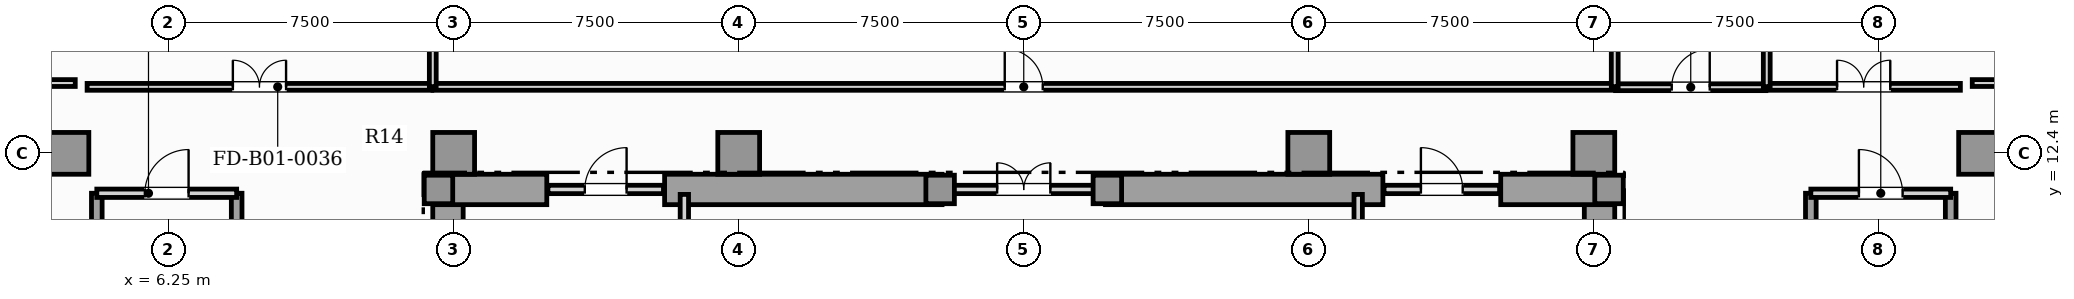
"""IFC4 building model, lengths in metres.
Left out: names, types, materials, properties, quantities, classifications, styles, units other than length and angle.
Written with IfcOpenShell. Run it as: python <this file> out.ifc"""

import sys

from ifc_helpers import new_model, si_unit, direction, frame, frame_2d, origin, origin_2d, place, context, subcontext, project, spatial, rectangle, extrude, element, fill, save


model = new_model("IFC4")
c1 = context("Model", 3, precision=1e-05, world=origin(), true_north=direction((0.0, 1.0)))
c2 = subcontext(c1, "Body", "Model", "MODEL_VIEW")
j1 = project(units=[si_unit("LENGTHUNIT", "METRE"), si_unit("PLANEANGLEUNIT", "RADIAN")], contexts=[c1])
p1 = place(None, origin())
s1 = spatial("IfcSite", under=j1, at=p1, CompositionType="ELEMENT")
p2 = place(p1, origin())
s2 = spatial("IfcBuilding", under=s1, at=p2, CompositionType="ELEMENT")
p3 = place(p2, frame((0.0, 0.0, -5.4)))
s3 = spatial("IfcBuildingStorey", under=s2, at=p3, CompositionType="ELEMENT", Elevation=-5.4)
for number, where, z_axis, x_axis in (
    (1, (13.6, 0.92, 0.0), (0.0, 0.0, 1.0), (0.0, 1.0, 0.0)),
    (2, (43.9, 0.92, 0.0), (0.0, 0.0, 1.0), (0.0, 1.0, 0.0)),
):
    element("IfcWall", number, at=place(p3, frame(where, z_axis=z_axis, x_axis=x_axis)), inside=s3, PredefinedType="SHEAR", context=c2, shape_type="SweptSolid", body=[
        extrude(rectangle(XDim=10.53, YDim=0.8, at=frame_2d((5.265, 0.0))), origin(), (0.0, 0.0, 1.0), 5.05),
    ])
p4 = place(p3, frame((13.25, 11.45, 0.0), z_axis=(0.0, 0.0, 1.0), x_axis=(1.0, 0.0, 0.0)))
e3 = element("IfcWall", 3, at=p4, inside=s3, PredefinedType="SHEAR", context=c2, shape_type="SweptSolid", body=[
    extrude(rectangle(XDim=2.95, YDim=0.8, at=frame_2d((1.475, 0.0))), origin(), (0.0, 0.0, 1.0), 5.05),
])
for number, where, z_axis, x_axis in (
    (4, (19.3, 11.45, 0.0), (0.0, 0.0, 1.0), (1.0, 0.0, 0.0)),
    (5, (30.9, 11.45, 0.0), (0.0, 0.0, 1.0), (1.0, 0.0, 0.0)),
):
    element("IfcWall", number, at=place(p3, frame(where, z_axis=z_axis, x_axis=x_axis)), inside=s3, PredefinedType="SHEAR", context=c2, shape_type="SweptSolid", body=[
        extrude(rectangle(XDim=7.3, YDim=0.8, at=frame_2d((3.65, 0.0))), origin(), (0.0, 0.0, 1.0), 5.05),
    ])
p5 = place(p3, frame((41.3, 11.45, 0.0), z_axis=(0.0, 0.0, 1.0), x_axis=(1.0, 0.0, 0.0)))
e6 = element("IfcWall", 6, at=p5, inside=s3, PredefinedType="SHEAR", context=c2, shape_type="SweptSolid", body=[
    extrude(rectangle(XDim=2.95, YDim=0.8, at=frame_2d((1.475, 0.0))), origin(), (0.0, 0.0, 1.0), 5.05),
])
for number, where, z_axis, x_axis in (
    (7, (13.35, 11.45, 0.0), (0.0, 0.0, 1.0), (1.0, 0.0, 0.0)),
    (8, (44.15, 11.45, 0.0), (0.0, 0.0, 1.0), (1.0, 0.0, 0.0)),
    (9, (26.55, 11.45, 0.0), (0.0, 0.0, 1.0), (1.0, 0.0, 0.0)),
    (10, (30.95, 11.45, 0.0), (0.0, 0.0, 1.0), (1.0, 0.0, 0.0)),
):
    element("IfcColumn", number, at=place(p3, frame(where, z_axis=z_axis, x_axis=x_axis)), inside=s3, PredefinedType="COLUMN", context=c2, shape_type="SweptSolid", body=[
        extrude(rectangle(XDim=0.75, YDim=0.75, at=origin_2d()), origin(), (0.0, 0.0, 1.0), 5.4),
    ])
for number, where, z_axis, x_axis in (
    (11, (3.6, 12.4, 0.0), (0.0, 0.0, 1.0), (1.0, 0.0, 0.0)),
    (12, (13.75, 12.4, 0.0), (0.0, 0.0, 1.0), (1.0, 0.0, 0.0)),
    (13, (43.75, 12.4, 0.0), (0.0, 0.0, 1.0), (1.0, 0.0, 0.0)),
    (14, (53.9, 12.4, 0.0), (0.0, 0.0, 1.0), (1.0, 0.0, 0.0)),
    (15, (21.25, 12.4, 0.0), (0.0, 0.0, 1.0), (1.0, 0.0, 0.0)),
    (16, (36.25, 12.4, 0.0), (0.0, 0.0, 1.0), (1.0, 0.0, 0.0)),
):
    element("IfcColumn", number, at=place(p3, frame(where, z_axis=z_axis, x_axis=x_axis)), inside=s3, PredefinedType="COLUMN", context=c2, shape_type="SweptSolid", body=[
        extrude(rectangle(XDim=1.1, YDim=1.1, at=origin_2d()), origin(), (0.0, 0.0, 1.0), 5.4),
    ])
for number, where, z_axis, x_axis in (
    (17, (4.36, 3.56, 0.0), (0.0, 0.0, 1.0), (0.0, 1.0, 0.0)),
    (18, (8.04, 3.56, 0.0), (0.0, 0.0, 1.0), (0.0, 1.0, 0.0)),
):
    element("IfcWall", number, at=place(p3, frame(where, z_axis=z_axis, x_axis=x_axis)), inside=s3, PredefinedType="SHEAR", context=c2, shape_type="SweptSolid", body=[
        extrude(rectangle(XDim=7.79, YDim=0.28, at=frame_2d((3.895, 0.0))), origin(), (0.0, 0.0, 1.0), 5.05),
    ])
p6 = place(p3, frame((4.36, 11.35, 0.0), z_axis=(0.0, 0.0, 1.0), x_axis=(1.0, 0.0, 0.0)))
e19 = element("IfcWall", 19, at=p6, inside=s3, PredefinedType="SOLIDWALL", context=c2, shape_type="SweptSolid", body=[
    extrude(rectangle(XDim=3.68, YDim=0.22, at=frame_2d((1.84, 0.0))), origin(), (0.0, 0.0, 1.0), 5.05),
])
p7 = place(p6, frame((1.265, 0.0, 0.0)))
e20 = element("IfcOpeningElement", 20, at=p7, cuts=e19, PredefinedType="OPENING", context=c2, shape_type="SweptSolid", body=[
    extrude(rectangle(XDim=1.15, YDim=2.2, at=frame_2d((0.575, 1.1))), frame((0.0, 0.12, 0.0), z_axis=(0.0, -1.0, 0.0), x_axis=(1.0, 0.0, 0.0)), (0.0, 0.0, 1.0), 0.24),
])
for number, where, z_axis, x_axis in (
    (21, (49.46, 3.56, 0.0), (0.0, 0.0, 1.0), (0.0, 1.0, 0.0)),
    (22, (53.14, 3.56, 0.0), (0.0, 0.0, 1.0), (0.0, 1.0, 0.0)),
):
    element("IfcWall", number, at=place(p3, frame(where, z_axis=z_axis, x_axis=x_axis)), inside=s3, PredefinedType="SHEAR", context=c2, shape_type="SweptSolid", body=[
        extrude(rectangle(XDim=7.79, YDim=0.28, at=frame_2d((3.895, 0.0))), origin(), (0.0, 0.0, 1.0), 5.05),
    ])
p8 = place(p3, frame((49.46, 11.35, 0.0), z_axis=(0.0, 0.0, 1.0), x_axis=(1.0, 0.0, 0.0)))
e23 = element("IfcWall", 23, at=p8, inside=s3, PredefinedType="SOLIDWALL", context=c2, shape_type="SweptSolid", body=[
    extrude(rectangle(XDim=3.68, YDim=0.22, at=frame_2d((1.84, 0.0))), origin(), (0.0, 0.0, 1.0), 5.05),
])
p9 = place(p8, frame((1.265, 0.0, 0.0)))
e24 = element("IfcOpeningElement", 24, at=p9, cuts=e23, PredefinedType="OPENING", context=c2, shape_type="SweptSolid", body=[
    extrude(rectangle(XDim=1.15, YDim=2.2, at=frame_2d((0.575, 1.1))), frame((0.0, 0.12, 0.0), z_axis=(0.0, -1.0, 0.0), x_axis=(1.0, 0.0, 0.0)), (0.0, 0.0, 1.0), 0.24),
])
p10 = place(p3, frame((19.82, 8.52, 0.0), z_axis=(0.0, 0.0, 1.0), x_axis=(0.0, 1.0, 0.0)))
e25 = element("IfcWall", 25, at=p10, inside=s3, PredefinedType="SOLIDWALL", context=c2, shape_type="SweptSolid", body=[
    extrude(rectangle(XDim=2.8, YDim=0.22, at=frame_2d((1.4, 0.0))), origin(), (0.0, 0.0, 1.0), 4.505),
])
p11 = place(p10, frame((0.85, 0.0, 0.0)))
e26 = element("IfcOpeningElement", 26, at=p11, cuts=e25, PredefinedType="OPENING", context=c2, shape_type="SweptSolid", body=[
    extrude(rectangle(XDim=1.1, YDim=2.2, at=frame_2d((0.55, 1.1))), frame((0.0, 0.12, 0.0), z_axis=(0.0, -1.0, 0.0), x_axis=(1.0, 0.0, 0.0)), (0.0, 0.0, 1.0), 0.24),
])
p12 = place(p3, frame((37.55, 8.52, 0.0), z_axis=(0.0, 0.0, 1.0), x_axis=(0.0, 1.0, 0.0)))
e27 = element("IfcWall", 27, at=p12, inside=s3, PredefinedType="SOLIDWALL", context=c2, shape_type="SweptSolid", body=[
    extrude(rectangle(XDim=2.8, YDim=0.22, at=frame_2d((1.4, 0.0))), origin(), (0.0, 0.0, 1.0), 4.505),
])
p13 = place(p12, frame((0.85, 0.0, 0.0)))
e28 = element("IfcOpeningElement", 28, at=p13, cuts=e27, PredefinedType="OPENING", context=c2, shape_type="SweptSolid", body=[
    extrude(rectangle(XDim=1.1, YDim=2.2, at=frame_2d((0.55, 1.1))), frame((0.0, 0.12, 0.0), z_axis=(0.0, -1.0, 0.0), x_axis=(1.0, 0.0, 0.0)), (0.0, 0.0, 1.0), 0.24),
])
p14 = place(p3, frame((16.23, 11.45, 0.0), z_axis=(0.0, 0.0, 1.0), x_axis=(1.0, 0.0, 0.0)))
e29 = element("IfcWall", 29, at=p14, inside=s3, PredefinedType="SOLIDWALL", context=c2, shape_type="SweptSolid", body=[
    extrude(rectangle(XDim=3.04, YDim=0.22, at=frame_2d((1.52, 0.0))), origin(), (0.0, 0.0, 1.0), 5.05),
])
p15 = place(p14, frame((0.97, 0.0, 0.0)))
e30 = element("IfcOpeningElement", 30, at=p15, cuts=e29, PredefinedType="OPENING", context=c2, shape_type="SweptSolid", body=[
    extrude(rectangle(XDim=1.1, YDim=2.2, at=frame_2d((0.55, 1.1))), frame((0.0, 0.12, 0.0), z_axis=(0.0, -1.0, 0.0), x_axis=(1.0, 0.0, 0.0)), (0.0, 0.0, 1.0), 0.24),
])
p16 = place(p3, frame((26.63, 11.45, 0.0), z_axis=(0.0, 0.0, 1.0), x_axis=(1.0, 0.0, 0.0)))
e31 = element("IfcWall", 31, at=p16, inside=s3, PredefinedType="SOLIDWALL", context=c2, shape_type="SweptSolid", body=[
    extrude(rectangle(XDim=4.24, YDim=0.22, at=frame_2d((2.12, 0.0))), origin(), (0.0, 0.0, 1.0), 5.05),
])
p17 = place(p16, frame((1.42, 0.0, 0.0)))
e32 = element("IfcOpeningElement", 32, at=p17, cuts=e31, PredefinedType="OPENING", context=c2, shape_type="SweptSolid", body=[
    extrude(rectangle(XDim=1.4, YDim=2.2, at=frame_2d((0.7, 1.1))), frame((0.0, 0.12, 0.0), z_axis=(0.0, -1.0, 0.0), x_axis=(1.0, 0.0, 0.0)), (0.0, 0.0, 1.0), 0.24),
])
p18 = place(p3, frame((38.23, 11.45, 0.0), z_axis=(0.0, 0.0, 1.0), x_axis=(1.0, 0.0, 0.0)))
e33 = element("IfcWall", 33, at=p18, inside=s3, PredefinedType="SOLIDWALL", context=c2, shape_type="SweptSolid", body=[
    extrude(rectangle(XDim=3.04, YDim=0.22, at=frame_2d((1.52, 0.0))), origin(), (0.0, 0.0, 1.0), 5.05),
])
p19 = place(p18, frame((0.97, 0.0, 0.0)))
e34 = element("IfcOpeningElement", 34, at=p19, cuts=e33, PredefinedType="OPENING", context=c2, shape_type="SweptSolid", body=[
    extrude(rectangle(XDim=1.1, YDim=2.2, at=frame_2d((0.55, 1.1))), frame((0.0, 0.12, 0.0), z_axis=(0.0, -1.0, 0.0), x_axis=(1.0, 0.0, 0.0)), (0.0, 0.0, 1.0), 0.24),
])
p20 = place(p3, frame((13.205, 14.15, 0.0), z_axis=(0.0, 0.0, 1.0), x_axis=(1.0, 0.0, 0.0)))
e35 = element("IfcWall", 35, at=p20, inside=s3, PredefinedType="PARTITIONING", context=c2, shape_type="SweptSolid", body=[
    extrude(rectangle(XDim=31.09, YDim=0.18, at=frame_2d((15.545, 0.0))), origin(), (0.0, 0.0, 1.0), 5.05),
])
p21 = place(p20, frame((15.045, 0.0, 0.0)))
e36 = element("IfcOpeningElement", 36, at=p21, cuts=e35, PredefinedType="OPENING", context=c2, shape_type="SweptSolid", body=[
    extrude(rectangle(XDim=1.0, YDim=2.15, at=frame_2d((0.5, 1.075))), frame((0.0, 0.1, 0.0), z_axis=(0.0, -1.0, 0.0), x_axis=(1.0, 0.0, 0.0)), (0.0, 0.0, 1.0), 0.2),
])
p22 = place(p3, frame((4.105, 14.15, 0.0), z_axis=(0.0, 0.0, 1.0), x_axis=(1.0, 0.0, 0.0)))
e37 = element("IfcWall", 37, at=p22, inside=s3, PredefinedType="PARTITIONING", context=c2, shape_type="SweptSolid", body=[
    extrude(rectangle(XDim=9.07, YDim=0.18, at=frame_2d((4.535, 0.0))), origin(), (0.0, 0.0, 1.0), 5.05),
])
p23 = place(p22, frame((3.835, 0.0, 0.0)))
e38 = element("IfcOpeningElement", 38, at=p23, cuts=e37, PredefinedType="OPENING", context=c2, shape_type="SweptSolid", body=[
    extrude(rectangle(XDim=1.4, YDim=2.2, at=frame_2d((0.7, 1.1))), frame((0.0, 0.1, 0.0), z_axis=(0.0, -1.0, 0.0), x_axis=(1.0, 0.0, 0.0)), (0.0, 0.0, 1.0), 0.2),
])
p24 = place(p3, frame((48.305, 14.15, 0.0), z_axis=(0.0, 0.0, 1.0), x_axis=(1.0, 0.0, 0.0)))
e39 = element("IfcWall", 39, at=p24, inside=s3, PredefinedType="PARTITIONING", context=c2, shape_type="SweptSolid", body=[
    extrude(rectangle(XDim=5.09, YDim=0.18, at=frame_2d((2.545, 0.0))), origin(), (0.0, 0.0, 1.0), 5.05),
])
p25 = place(p24, frame((1.845, 0.0, 0.0)))
e40 = element("IfcOpeningElement", 40, at=p25, cuts=e39, PredefinedType="OPENING", context=c2, shape_type="SweptSolid", body=[
    extrude(rectangle(XDim=1.4, YDim=2.2, at=frame_2d((0.7, 1.1))), frame((0.0, 0.1, 0.0), z_axis=(0.0, -1.0, 0.0), x_axis=(1.0, 0.0, 0.0)), (0.0, 0.0, 1.0), 0.2),
])
p26 = place(p3, frame((44.323, 14.14, 0.0), z_axis=(0.0, 0.0, 1.0), x_axis=(1.0, 0.0, 0.0)))
e41 = element("IfcWall", 41, at=p26, inside=s3, PredefinedType="PARTITIONING", context=c2, shape_type="SweptSolid", body=[
    extrude(rectangle(XDim=3.954, YDim=0.18, at=frame_2d((1.977, 0.0))), origin(), (0.0, 0.0, 1.0), 5.05),
])
p27 = place(p26, frame((1.477, 0.0, 0.0)))
e42 = element("IfcOpeningElement", 42, at=p27, cuts=e41, PredefinedType="OPENING", context=c2, shape_type="SweptSolid", body=[
    extrude(rectangle(XDim=1.0, YDim=2.15, at=frame_2d((0.5, 1.075))), frame((0.0, 0.1, 0.0), z_axis=(0.0, -1.0, 0.0), x_axis=(1.0, 0.0, 0.0)), (0.0, 0.0, 1.0), 0.2),
])
p28 = place(p3, frame((13.2, 14.155, 0.0), z_axis=(0.0, 0.0, 1.0), x_axis=(0.0, 1.0, 0.0)))
e43 = element("IfcWall", 43, at=p28, inside=s3, PredefinedType="PARTITIONING", context=c2, shape_type="SweptSolid", body=[
    extrude(rectangle(XDim=15.74, YDim=0.18, at=frame_2d((7.87, 0.0))), origin(), (0.0, 0.0, 1.0), 5.05),
])
p29 = place(p28, frame((7.17, 0.0, 0.0)))
e44 = element("IfcOpeningElement", 44, at=p29, cuts=e43, PredefinedType="OPENING", context=c2, shape_type="SweptSolid", body=[
    extrude(rectangle(XDim=1.4, YDim=2.2, at=frame_2d((0.7, 1.1))), frame((0.0, 0.1, 0.0), z_axis=(0.0, -1.0, 0.0), x_axis=(1.0, 0.0, 0.0)), (0.0, 0.0, 1.0), 0.2),
])
p30 = place(p3, frame((44.3, 14.155, 0.0), z_axis=(0.0, 0.0, 1.0), x_axis=(0.0, 1.0, 0.0)))
e45 = element("IfcWall", 45, at=p30, inside=s3, PredefinedType="PARTITIONING", context=c2, shape_type="SweptSolid", body=[
    extrude(rectangle(XDim=21.94, YDim=0.18, at=frame_2d((10.97, 0.0))), origin(), (0.0, 0.0, 1.0), 5.05),
])
p31 = place(p30, frame((10.47, 0.0, 0.0)))
e46 = element("IfcOpeningElement", 46, at=p31, cuts=e45, PredefinedType="OPENING", context=c2, shape_type="SweptSolid", body=[
    extrude(rectangle(XDim=1.0, YDim=2.15, at=frame_2d((0.5, 1.075))), frame((0.0, 0.1, 0.0), z_axis=(0.0, -1.0, 0.0), x_axis=(1.0, 0.0, 0.0)), (0.0, 0.0, 1.0), 0.2),
])
p32 = place(p3, frame((48.3, 14.155, 0.0), z_axis=(0.0, 0.0, 1.0), x_axis=(0.0, 1.0, 0.0)))
e47 = element("IfcWall", 47, at=p32, inside=s3, PredefinedType="PARTITIONING", context=c2, shape_type="SweptSolid", body=[
    extrude(rectangle(XDim=15.74, YDim=0.18, at=frame_2d((7.87, 0.0))), origin(), (0.0, 0.0, 1.0), 5.05),
])
p33 = place(p32, frame((7.17, 0.0, 0.0)))
e48 = element("IfcOpeningElement", 48, at=p33, cuts=e47, PredefinedType="OPENING", context=c2, shape_type="SweptSolid", body=[
    extrude(rectangle(XDim=1.4, YDim=2.2, at=frame_2d((0.7, 1.1))), frame((0.0, 0.1, 0.0), z_axis=(0.0, -1.0, 0.0), x_axis=(1.0, 0.0, 0.0)), (0.0, 0.0, 1.0), 0.2),
])
p34 = place(p3, frame((-0.705, 14.25, 0.0), z_axis=(0.0, 0.0, 1.0), x_axis=(1.0, 0.0, 0.0)))
e49 = element("IfcWall", 49, at=p34, inside=s3, PredefinedType="PARTITIONING", context=c2, shape_type="SweptSolid", body=[
    extrude(rectangle(XDim=4.498, YDim=0.18, at=frame_2d((2.249, 0.0))), origin(), (0.0, 0.0, 1.0), 5.05),
])
p35 = place(p3, frame((53.708, 14.25, 0.0), z_axis=(0.0, 0.0, 1.0), x_axis=(1.0, 0.0, 0.0)))
e50 = element("IfcWall", 50, at=p35, inside=s3, PredefinedType="PARTITIONING", context=c2, shape_type="SweptSolid", body=[
    extrude(rectangle(XDim=5.887, YDim=0.18, at=frame_2d((2.944, 0.0))), origin(), (0.0, 0.0, 1.0), 5.05),
])
p36 = place(p7, origin())
e51 = element("IfcDoor", 51, at=p36, inside=s3, OperationType="SINGLE_SWING_RIGHT", PredefinedType="DOOR", context=c2, shape_type="SweptSolid", body=[
    extrude(rectangle(XDim=1.15, YDim=2.2, at=frame_2d((0.575, 1.1))), frame((0.0, 0.025, 0.0), z_axis=(0.0, -1.0, 0.0), x_axis=(1.0, 0.0, 0.0)), (0.0, 0.0, 1.0), 0.05),
])
fill(e20, e51)
p37 = place(p9, origin())
e52 = element("IfcDoor", 52, at=p37, inside=s3, OperationType="SINGLE_SWING_LEFT", PredefinedType="DOOR", context=c2, shape_type="SweptSolid", body=[
    extrude(rectangle(XDim=1.15, YDim=2.2, at=frame_2d((0.575, 1.1))), frame((0.0, 0.025, 0.0), z_axis=(0.0, -1.0, 0.0), x_axis=(1.0, 0.0, 0.0)), (0.0, 0.0, 1.0), 0.05),
])
fill(e24, e52)
p38 = place(p15, origin())
e53 = element("IfcDoor", 53, at=p38, inside=s3, OperationType="SINGLE_SWING_RIGHT", PredefinedType="DOOR", context=c2, shape_type="SweptSolid", body=[
    extrude(rectangle(XDim=1.1, YDim=2.2, at=frame_2d((0.55, 1.1))), frame((0.0, 0.025, 0.0), z_axis=(0.0, -1.0, 0.0), x_axis=(1.0, 0.0, 0.0)), (0.0, 0.0, 1.0), 0.05),
])
fill(e30, e53)
p39 = place(p17, origin())
e54 = element("IfcDoor", 54, at=p39, inside=s3, OperationType="DOUBLE_DOOR_SINGLE_SWING", PredefinedType="DOOR", context=c2, shape_type="SweptSolid", body=[
    extrude(rectangle(XDim=1.4, YDim=2.2, at=frame_2d((0.7, 1.1))), frame((0.0, 0.025, 0.0), z_axis=(0.0, -1.0, 0.0), x_axis=(1.0, 0.0, 0.0)), (0.0, 0.0, 1.0), 0.05),
])
fill(e32, e54)
p40 = place(p19, origin())
e55 = element("IfcDoor", 55, at=p40, inside=s3, OperationType="SINGLE_SWING_LEFT", PredefinedType="DOOR", context=c2, shape_type="SweptSolid", body=[
    extrude(rectangle(XDim=1.1, YDim=2.2, at=frame_2d((0.55, 1.1))), frame((0.0, 0.025, 0.0), z_axis=(0.0, -1.0, 0.0), x_axis=(1.0, 0.0, 0.0)), (0.0, 0.0, 1.0), 0.05),
])
fill(e34, e55)
p41 = place(p21, origin())
e56 = element("IfcDoor", 56, at=p41, inside=s3, OperationType="SINGLE_SWING_LEFT", PredefinedType="DOOR", context=c2, shape_type="SweptSolid", body=[
    extrude(rectangle(XDim=1.0, YDim=2.15, at=frame_2d((0.5, 1.075))), frame((0.0, 0.025, 0.0), z_axis=(0.0, -1.0, 0.0), x_axis=(1.0, 0.0, 0.0)), (0.0, 0.0, 1.0), 0.05),
])
fill(e36, e56)
p42 = place(p23, origin())
e57 = element("IfcDoor", 57, at=p42, inside=s3, OperationType="DOUBLE_DOOR_SINGLE_SWING", PredefinedType="DOOR", context=c2, shape_type="SweptSolid", body=[
    extrude(rectangle(XDim=1.4, YDim=2.2, at=frame_2d((0.7, 1.1))), frame((0.0, 0.025, 0.0), z_axis=(0.0, -1.0, 0.0), x_axis=(1.0, 0.0, 0.0)), (0.0, 0.0, 1.0), 0.05),
])
fill(e38, e57)
p43 = place(p25, origin())
e58 = element("IfcDoor", 58, at=p43, inside=s3, OperationType="DOUBLE_DOOR_SINGLE_SWING", PredefinedType="DOOR", context=c2, shape_type="SweptSolid", body=[
    extrude(rectangle(XDim=1.4, YDim=2.2, at=frame_2d((0.7, 1.1))), frame((0.0, 0.025, 0.0), z_axis=(0.0, -1.0, 0.0), x_axis=(1.0, 0.0, 0.0)), (0.0, 0.0, 1.0), 0.05),
])
fill(e40, e58)
p44 = place(p27, origin())
e59 = element("IfcDoor", 59, at=p44, inside=s3, OperationType="SINGLE_SWING_RIGHT", PredefinedType="DOOR", context=c2, shape_type="SweptSolid", body=[
    extrude(rectangle(XDim=1.0, YDim=2.15, at=frame_2d((0.5, 1.075))), frame((0.0, 0.025, 0.0), z_axis=(0.0, -1.0, 0.0), x_axis=(1.0, 0.0, 0.0)), (0.0, 0.0, 1.0), 0.05),
])
fill(e42, e59)
save(model, sys.argv[1])
